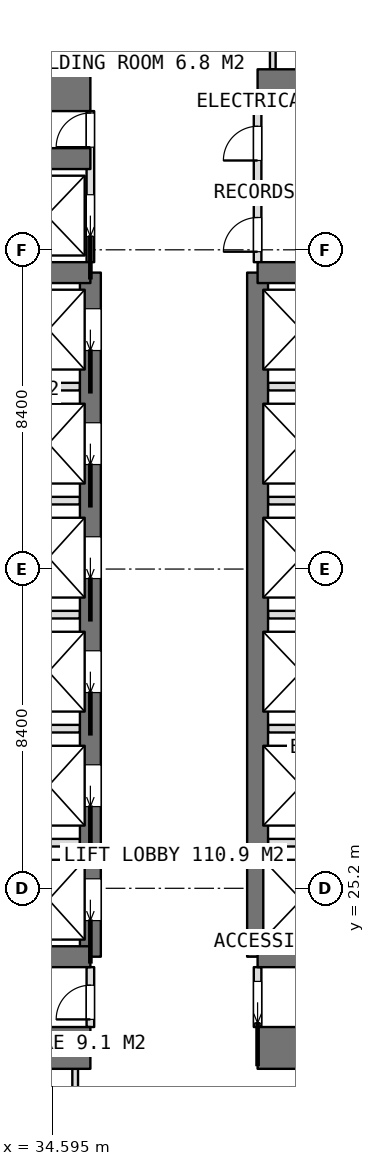
"""IFC4 building model, lengths in metres.
Left out: names, types, materials, properties, quantities, classifications, styles, units other than length and angle.
Written with IfcOpenShell. Run it as: python <this file> out.ifc"""

import sys

from ifc_helpers import new_model, si_unit, direction, frame, frame_2d, origin, place, context, subcontext, project, spatial, rectangle, extrude, element, fill, save


model = new_model("IFC4")
c1 = context("Model", 3, precision=1e-05, world=origin(), true_north=direction((0.0, 1.0)))
c2 = subcontext(c1, "Body", "Model", "MODEL_VIEW")
j1 = project(units=[si_unit("LENGTHUNIT", "METRE"), si_unit("PLANEANGLEUNIT", "RADIAN")], contexts=[c1])
p1 = place(None, origin())
s1 = spatial("IfcSite", under=j1, at=p1, CompositionType="ELEMENT")
p2 = place(p1, origin())
s2 = spatial("IfcBuilding", under=s1, at=p2, CompositionType="ELEMENT")
p3 = place(p2, frame((0.0, 0.0, 51.65)))
s3 = spatial("IfcBuildingStorey", under=s2, at=p3, CompositionType="ELEMENT", Elevation=51.65)
p4 = place(p3, frame((25.2, 21.0, 0.0), z_axis=(0.0, 0.0, 1.0), x_axis=(1.0, 0.0, 0.0)))
e1 = element("IfcWall", 1, at=p4, inside=s3, PredefinedType="SHEAR", context=c2, shape_type="SweptSolid", body=[
    extrude(rectangle(XDim=10.4, YDim=1.1, at=frame_2d((5.2, 0.0))), origin(), (0.0, 0.0, 1.0), 3.75),
])
p5 = place(p3, frame((40.0, 21.0, 0.0), z_axis=(0.0, 0.0, 1.0), x_axis=(1.0, 0.0, 0.0)))
e2 = element("IfcWall", 2, at=p5, inside=s3, PredefinedType="SHEAR", context=c2, shape_type="SweptSolid", body=[
    extrude(rectangle(XDim=10.4, YDim=1.1, at=frame_2d((5.2, 0.0))), origin(), (0.0, 0.0, 1.0), 3.75),
])
p6 = place(p3, frame((25.2, 46.2, 0.0), z_axis=(0.0, 0.0, 1.0), x_axis=(1.0, 0.0, 0.0)))
e3 = element("IfcWall", 3, at=p6, inside=s3, PredefinedType="SHEAR", context=c2, shape_type="SweptSolid", body=[
    extrude(rectangle(XDim=10.4, YDim=1.1, at=frame_2d((5.2, 0.0))), origin(), (0.0, 0.0, 1.0), 3.75),
])
p7 = place(p3, frame((40.0, 46.2, 0.0), z_axis=(0.0, 0.0, 1.0), x_axis=(1.0, 0.0, 0.0)))
e4 = element("IfcWall", 4, at=p7, inside=s3, PredefinedType="SHEAR", context=c2, shape_type="SweptSolid", body=[
    extrude(rectangle(XDim=10.4, YDim=1.1, at=frame_2d((5.2, 0.0))), origin(), (0.0, 0.0, 1.0), 3.75),
])
p8 = place(p3, frame((35.6, 23.4, 0.0), z_axis=(0.0, 0.0, 1.0), x_axis=(0.0, 1.0, 0.0)))
e5 = element("IfcWall", 5, at=p8, inside=s3, PredefinedType="SHEAR", context=c2, shape_type="SweptSolid", body=[
    extrude(rectangle(XDim=18.0, YDim=0.55, at=frame_2d((9.0, 0.0))), origin(), (0.0, 0.0, 1.0), 3.75),
])
p9 = place(p8, frame((0.95, 0.0, 0.0)))
e6 = element("IfcOpeningElement", 6, at=p9, cuts=e5, PredefinedType="OPENING", context=c2, shape_type="SweptSolid", body=[
    extrude(rectangle(XDim=1.1, YDim=2.1, at=frame_2d((0.55, 1.05))), frame((0.0, 0.285, 0.0), z_axis=(0.0, -1.0, 0.0), x_axis=(1.0, 0.0, 0.0)), (0.0, 0.0, 1.0), 0.57),
])
p10 = place(p8, frame((3.95, 0.0, 0.0)))
e7 = element("IfcOpeningElement", 7, at=p10, cuts=e5, PredefinedType="OPENING", context=c2, shape_type="SweptSolid", body=[
    extrude(rectangle(XDim=1.1, YDim=2.1, at=frame_2d((0.55, 1.05))), frame((0.0, 0.285, 0.0), z_axis=(0.0, -1.0, 0.0), x_axis=(1.0, 0.0, 0.0)), (0.0, 0.0, 1.0), 0.57),
])
p11 = place(p8, frame((6.95, 0.0, 0.0)))
e8 = element("IfcOpeningElement", 8, at=p11, cuts=e5, PredefinedType="OPENING", context=c2, shape_type="SweptSolid", body=[
    extrude(rectangle(XDim=1.1, YDim=2.1, at=frame_2d((0.55, 1.05))), frame((0.0, 0.285, 0.0), z_axis=(0.0, -1.0, 0.0), x_axis=(1.0, 0.0, 0.0)), (0.0, 0.0, 1.0), 0.57),
])
p12 = place(p8, frame((9.95, 0.0, 0.0)))
e9 = element("IfcOpeningElement", 9, at=p12, cuts=e5, PredefinedType="OPENING", context=c2, shape_type="SweptSolid", body=[
    extrude(rectangle(XDim=1.1, YDim=2.1, at=frame_2d((0.55, 1.05))), frame((0.0, 0.285, 0.0), z_axis=(0.0, -1.0, 0.0), x_axis=(1.0, 0.0, 0.0)), (0.0, 0.0, 1.0), 0.57),
])
p13 = place(p8, frame((12.95, 0.0, 0.0)))
e10 = element("IfcOpeningElement", 10, at=p13, cuts=e5, PredefinedType="OPENING", context=c2, shape_type="SweptSolid", body=[
    extrude(rectangle(XDim=1.1, YDim=2.1, at=frame_2d((0.55, 1.05))), frame((0.0, 0.285, 0.0), z_axis=(0.0, -1.0, 0.0), x_axis=(1.0, 0.0, 0.0)), (0.0, 0.0, 1.0), 0.57),
])
p14 = place(p8, frame((15.95, 0.0, 0.0)))
e11 = element("IfcOpeningElement", 11, at=p14, cuts=e5, PredefinedType="OPENING", context=c2, shape_type="SweptSolid", body=[
    extrude(rectangle(XDim=1.1, YDim=2.1, at=frame_2d((0.55, 1.05))), frame((0.0, 0.285, 0.0), z_axis=(0.0, -1.0, 0.0), x_axis=(1.0, 0.0, 0.0)), (0.0, 0.0, 1.0), 0.57),
])
p15 = place(p3, frame((40.0, 23.4, 0.0), z_axis=(0.0, 0.0, 1.0), x_axis=(0.0, 1.0, 0.0)))
e12 = element("IfcWall", 12, at=p15, inside=s3, PredefinedType="SHEAR", context=c2, shape_type="SweptSolid", body=[
    extrude(rectangle(XDim=18.0, YDim=0.55, at=frame_2d((9.0, 0.0))), origin(), (0.0, 0.0, 1.0), 3.75),
])
for number, where, z_axis, x_axis in (
    (13, (31.8, 23.4, 0.0), (0.0, 0.0, 1.0), (1.0, 0.0, 0.0)),
    (14, (31.8, 41.4, 0.0), (0.0, 0.0, 1.0), (1.0, 0.0, 0.0)),
    (15, (31.8, 44.4, 0.0), (0.0, 0.0, 1.0), (1.0, 0.0, 0.0)),
    (16, (40.0, 23.4, 0.0), (0.0, 0.0, 1.0), (1.0, 0.0, 0.0)),
    (17, (40.0, 41.4, 0.0), (0.0, 0.0, 1.0), (1.0, 0.0, 0.0)),
):
    element("IfcWall", number, at=place(p3, frame(where, z_axis=z_axis, x_axis=x_axis)), inside=s3, PredefinedType="SHEAR", context=c2, shape_type="SweptSolid", body=[
        extrude(rectangle(XDim=3.8, YDim=0.55, at=frame_2d((1.9, 0.0))), origin(), (0.0, 0.0, 1.0), 3.75),
    ])
for number, where, z_axis, x_axis in (
    (18, (32.075, 26.4, 0.0), (0.0, 0.0, 1.0), (1.0, 0.0, 0.0)),
    (19, (32.075, 29.4, 0.0), (0.0, 0.0, 1.0), (1.0, 0.0, 0.0)),
    (20, (32.075, 32.4, 0.0), (0.0, 0.0, 1.0), (1.0, 0.0, 0.0)),
    (21, (32.075, 35.4, 0.0), (0.0, 0.0, 1.0), (1.0, 0.0, 0.0)),
    (22, (32.075, 38.4, 0.0), (0.0, 0.0, 1.0), (1.0, 0.0, 0.0)),
    (23, (40.275, 26.4, 0.0), (0.0, 0.0, 1.0), (1.0, 0.0, 0.0)),
    (24, (40.275, 29.4, 0.0), (0.0, 0.0, 1.0), (1.0, 0.0, 0.0)),
    (25, (40.275, 32.4, 0.0), (0.0, 0.0, 1.0), (1.0, 0.0, 0.0)),
    (26, (40.275, 35.4, 0.0), (0.0, 0.0, 1.0), (1.0, 0.0, 0.0)),
    (27, (40.275, 38.4, 0.0), (0.0, 0.0, 1.0), (1.0, 0.0, 0.0)),
):
    element("IfcWall", number, at=place(p3, frame(where, z_axis=z_axis, x_axis=x_axis)), inside=s3, PredefinedType="PARTITIONING", context=c2, shape_type="SweptSolid", body=[
        extrude(rectangle(XDim=3.25, YDim=0.2, at=frame_2d((1.625, 0.0))), origin(), (0.0, 0.0, 1.0), 3.5),
    ])
p16 = place(p3, frame((40.0, 21.55, 0.0), z_axis=(0.0, 0.0, 1.0), x_axis=(0.0, 1.0, 0.0)))
e28 = element("IfcWall", 28, at=p16, inside=s3, PredefinedType="PARTITIONING", context=c2, shape_type="SweptSolid", body=[
    extrude(rectangle(XDim=1.575, YDim=0.2, at=frame_2d((0.788, 0.0))), origin(), (0.0, 0.0, 1.0), 3.5),
])
p17 = place(p16, frame((0.1, 0.0, 0.0)))
e29 = element("IfcOpeningElement", 29, at=p17, cuts=e28, PredefinedType="OPENING", context=c2, shape_type="SweptSolid", body=[
    extrude(rectangle(XDim=1.1, YDim=2.1, at=frame_2d((0.55, 1.05))), frame((0.0, 0.11, 0.0), z_axis=(0.0, -1.0, 0.0), x_axis=(1.0, 0.0, 0.0)), (0.0, 0.0, 1.0), 0.22),
])
p18 = place(p3, frame((40.0, 41.675, 0.0), z_axis=(0.0, 0.0, 1.0), x_axis=(0.0, 1.0, 0.0)))
e30 = element("IfcWall", 30, at=p18, inside=s3, PredefinedType="PARTITIONING", context=c2, shape_type="SweptSolid", body=[
    extrude(rectangle(XDim=3.975, YDim=0.2, at=frame_2d((1.987, 0.0))), origin(), (0.0, 0.0, 1.0), 3.5),
])
p19 = place(p18, frame((2.675, 0.0, 0.0)))
e31 = element("IfcOpeningElement", 31, at=p19, cuts=e30, PredefinedType="OPENING", context=c2, shape_type="SweptSolid", body=[
    extrude(rectangle(XDim=0.9, YDim=2.1, at=frame_2d((0.45, 1.05))), frame((0.0, 0.11, 0.0), z_axis=(0.0, -1.0, 0.0), x_axis=(1.0, 0.0, 0.0)), (0.0, 0.0, 1.0), 0.22),
])
p20 = place(p18, frame((0.275, 0.0, 0.0)))
e32 = element("IfcOpeningElement", 32, at=p20, cuts=e30, PredefinedType="OPENING", context=c2, shape_type="SweptSolid", body=[
    extrude(rectangle(XDim=0.9, YDim=2.1, at=frame_2d((0.45, 1.05))), frame((0.0, 0.11, 0.0), z_axis=(0.0, -1.0, 0.0), x_axis=(1.0, 0.0, 0.0)), (0.0, 0.0, 1.0), 0.22),
])
p21 = place(p3, frame((35.6, 41.675, 0.0), z_axis=(0.0, 0.0, 1.0), x_axis=(0.0, 1.0, 0.0)))
e33 = element("IfcWall", 33, at=p21, inside=s3, PredefinedType="PARTITIONING", context=c2, shape_type="SweptSolid", body=[
    extrude(rectangle(XDim=3.975, YDim=0.2, at=frame_2d((1.987, 0.0))), origin(), (0.0, 0.0, 1.0), 3.5),
])
p22 = place(p21, frame((3.025, 0.0, 0.0)))
e34 = element("IfcOpeningElement", 34, at=p22, cuts=e33, PredefinedType="OPENING", context=c2, shape_type="SweptSolid", body=[
    extrude(rectangle(XDim=0.9, YDim=2.1, at=frame_2d((0.45, 1.05))), frame((0.0, 0.11, 0.0), z_axis=(0.0, -1.0, 0.0), x_axis=(1.0, 0.0, 0.0)), (0.0, 0.0, 1.0), 0.22),
])
p23 = place(p21, frame((0.675, 0.0, 0.0)))
e35 = element("IfcOpeningElement", 35, at=p23, cuts=e33, PredefinedType="OPENING", context=c2, shape_type="SweptSolid", body=[
    extrude(rectangle(XDim=1.1, YDim=2.1, at=frame_2d((0.55, 1.05))), frame((0.0, 0.11, 0.0), z_axis=(0.0, -1.0, 0.0), x_axis=(1.0, 0.0, 0.0)), (0.0, 0.0, 1.0), 0.22),
])
p24 = place(p3, frame((35.6, 21.55, 0.0), z_axis=(0.0, 0.0, 1.0), x_axis=(0.0, 1.0, 0.0)))
e36 = element("IfcWall", 36, at=p24, inside=s3, PredefinedType="PARTITIONING", context=c2, shape_type="SweptSolid", body=[
    extrude(rectangle(XDim=1.575, YDim=0.2, at=frame_2d((0.788, 0.0))), origin(), (0.0, 0.0, 1.0), 3.5),
])
p25 = place(p24, frame((0.2, 0.0, 0.0)))
e37 = element("IfcOpeningElement", 37, at=p25, cuts=e36, PredefinedType="OPENING", context=c2, shape_type="SweptSolid", body=[
    extrude(rectangle(XDim=0.9, YDim=2.1, at=frame_2d((0.45, 1.05))), frame((0.0, 0.11, 0.0), z_axis=(0.0, -1.0, 0.0), x_axis=(1.0, 0.0, 0.0)), (0.0, 0.0, 1.0), 0.22),
])
p26 = place(p3, frame((40.0, 43.4, 0.0), z_axis=(0.0, 0.0, 1.0), x_axis=(1.0, 0.0, 0.0)))
e38 = element("IfcWall", 38, at=p26, inside=s3, PredefinedType="PARTITIONING", context=c2, shape_type="SweptSolid", body=[
    extrude(rectangle(XDim=3.525, YDim=0.2, at=frame_2d((1.762, 0.0))), origin(), (0.0, 0.0, 1.0), 3.5),
])
for number, where, z_axis, x_axis in (
    (39, (40.4, 46.75, 0.0), (0.0, 0.0, 1.0), (0.0, 1.0, 0.0)),
    (40, (35.2, 46.75, 0.0), (0.0, 0.0, 1.0), (0.0, 1.0, 0.0)),
    (41, (35.2, 17.875, 0.0), (0.0, 0.0, 1.0), (0.0, 1.0, 0.0)),
):
    element("IfcWall", number, at=place(p3, frame(where, z_axis=z_axis, x_axis=x_axis)), inside=s3, PredefinedType="PARTITIONING", context=c2, shape_type="SweptSolid", body=[
        extrude(rectangle(XDim=2.575, YDim=0.15, at=frame_2d((1.288, 0.0))), origin(), (0.0, 0.0, 1.0), 3.5),
    ])
p27 = place(p17, origin())
e42 = element("IfcDoor", 42, at=p27, inside=s3, OperationType="SLIDING_TO_LEFT", PredefinedType="DOOR", context=c2, shape_type="SweptSolid", body=[
    extrude(rectangle(XDim=1.1, YDim=2.1, at=frame_2d((0.55, 1.05))), frame((0.0, 0.025, 0.0), z_axis=(0.0, -1.0, 0.0), x_axis=(1.0, 0.0, 0.0)), (0.0, 0.0, 1.0), 0.05),
])
fill(e29, e42)
p28 = place(p25, origin())
e43 = element("IfcDoor", 43, at=p28, inside=s3, OperationType="SINGLE_SWING_LEFT", PredefinedType="DOOR", context=c2, shape_type="SweptSolid", body=[
    extrude(rectangle(XDim=0.9, YDim=2.1, at=frame_2d((0.45, 1.05))), frame((0.0, 0.025, 0.0), z_axis=(0.0, -1.0, 0.0), x_axis=(1.0, 0.0, 0.0)), (0.0, 0.0, 1.0), 0.05),
])
fill(e37, e43)
p29 = place(p19, origin())
e44 = element("IfcDoor", 44, at=p29, inside=s3, OperationType="SINGLE_SWING_LEFT", PredefinedType="DOOR", context=c2, shape_type="SweptSolid", body=[
    extrude(rectangle(XDim=0.9, YDim=2.1, at=frame_2d((0.45, 1.05))), frame((0.0, 0.025, 0.0), z_axis=(0.0, -1.0, 0.0), x_axis=(1.0, 0.0, 0.0)), (0.0, 0.0, 1.0), 0.05),
])
fill(e31, e44)
p30 = place(p20, origin())
e45 = element("IfcDoor", 45, at=p30, inside=s3, OperationType="SINGLE_SWING_LEFT", PredefinedType="DOOR", context=c2, shape_type="SweptSolid", body=[
    extrude(rectangle(XDim=0.9, YDim=2.1, at=frame_2d((0.45, 1.05))), frame((0.0, 0.025, 0.0), z_axis=(0.0, -1.0, 0.0), x_axis=(1.0, 0.0, 0.0)), (0.0, 0.0, 1.0), 0.05),
])
fill(e32, e45)
p31 = place(p22, origin())
e46 = element("IfcDoor", 46, at=p31, inside=s3, OperationType="SINGLE_SWING_LEFT", PredefinedType="DOOR", context=c2, shape_type="SweptSolid", body=[
    extrude(rectangle(XDim=0.9, YDim=2.1, at=frame_2d((0.45, 1.05))), frame((0.0, 0.025, 0.0), z_axis=(0.0, -1.0, 0.0), x_axis=(1.0, 0.0, 0.0)), (0.0, 0.0, 1.0), 0.05),
])
fill(e34, e46)
p32 = place(p9, origin())
e47 = element("IfcDoor", 47, at=p32, inside=s3, OperationType="SLIDING_TO_LEFT", PredefinedType="USERDEFINED", context=c2, shape_type="SweptSolid", body=[
    extrude(rectangle(XDim=1.1, YDim=2.1, at=frame_2d((0.55, 1.05))), frame((0.0, 0.025, 0.0), z_axis=(0.0, -1.0, 0.0), x_axis=(1.0, 0.0, 0.0)), (0.0, 0.0, 1.0), 0.05),
])
fill(e6, e47)
p33 = place(p10, origin())
e48 = element("IfcDoor", 48, at=p33, inside=s3, OperationType="SLIDING_TO_LEFT", PredefinedType="USERDEFINED", context=c2, shape_type="SweptSolid", body=[
    extrude(rectangle(XDim=1.1, YDim=2.1, at=frame_2d((0.55, 1.05))), frame((0.0, 0.025, 0.0), z_axis=(0.0, -1.0, 0.0), x_axis=(1.0, 0.0, 0.0)), (0.0, 0.0, 1.0), 0.05),
])
fill(e7, e48)
p34 = place(p11, origin())
e49 = element("IfcDoor", 49, at=p34, inside=s3, OperationType="SLIDING_TO_LEFT", PredefinedType="USERDEFINED", context=c2, shape_type="SweptSolid", body=[
    extrude(rectangle(XDim=1.1, YDim=2.1, at=frame_2d((0.55, 1.05))), frame((0.0, 0.025, 0.0), z_axis=(0.0, -1.0, 0.0), x_axis=(1.0, 0.0, 0.0)), (0.0, 0.0, 1.0), 0.05),
])
fill(e8, e49)
p35 = place(p12, origin())
e50 = element("IfcDoor", 50, at=p35, inside=s3, OperationType="SLIDING_TO_LEFT", PredefinedType="USERDEFINED", context=c2, shape_type="SweptSolid", body=[
    extrude(rectangle(XDim=1.1, YDim=2.1, at=frame_2d((0.55, 1.05))), frame((0.0, 0.025, 0.0), z_axis=(0.0, -1.0, 0.0), x_axis=(1.0, 0.0, 0.0)), (0.0, 0.0, 1.0), 0.05),
])
fill(e9, e50)
p36 = place(p13, origin())
e51 = element("IfcDoor", 51, at=p36, inside=s3, OperationType="SLIDING_TO_LEFT", PredefinedType="USERDEFINED", context=c2, shape_type="SweptSolid", body=[
    extrude(rectangle(XDim=1.1, YDim=2.1, at=frame_2d((0.55, 1.05))), frame((0.0, 0.025, 0.0), z_axis=(0.0, -1.0, 0.0), x_axis=(1.0, 0.0, 0.0)), (0.0, 0.0, 1.0), 0.05),
])
fill(e10, e51)
p37 = place(p14, origin())
e52 = element("IfcDoor", 52, at=p37, inside=s3, OperationType="SLIDING_TO_LEFT", PredefinedType="USERDEFINED", context=c2, shape_type="SweptSolid", body=[
    extrude(rectangle(XDim=1.1, YDim=2.1, at=frame_2d((0.55, 1.05))), frame((0.0, 0.025, 0.0), z_axis=(0.0, -1.0, 0.0), x_axis=(1.0, 0.0, 0.0)), (0.0, 0.0, 1.0), 0.05),
])
fill(e11, e52)
p38 = place(p23, origin())
e53 = element("IfcDoor", 53, at=p38, inside=s3, OperationType="SLIDING_TO_LEFT", PredefinedType="USERDEFINED", context=c2, shape_type="SweptSolid", body=[
    extrude(rectangle(XDim=1.1, YDim=2.1, at=frame_2d((0.55, 1.05))), frame((0.0, 0.025, 0.0), z_axis=(0.0, -1.0, 0.0), x_axis=(1.0, 0.0, 0.0)), (0.0, 0.0, 1.0), 0.05),
])
fill(e35, e53)
save(model, sys.argv[1])
